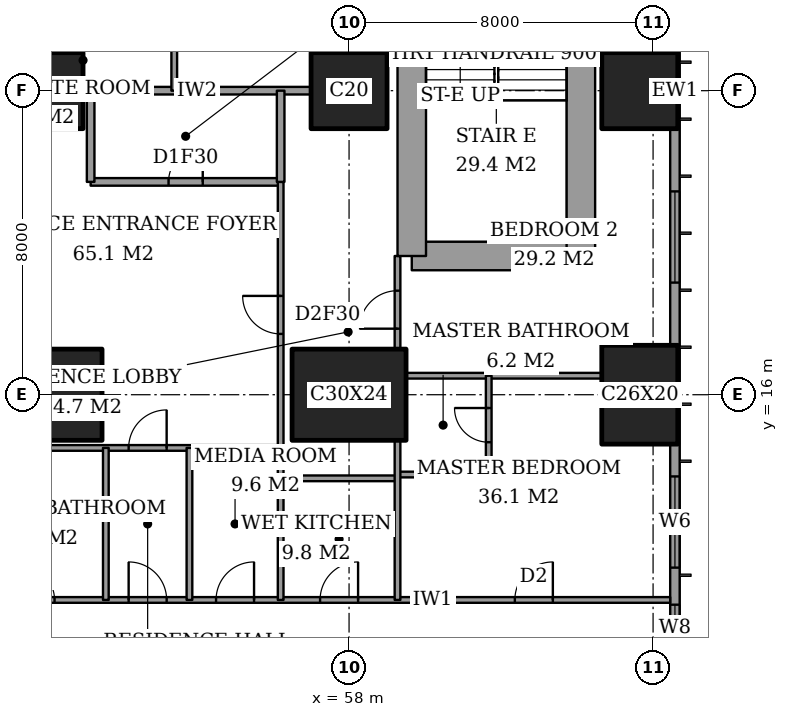
"""IFC4 building model, lengths in metres.
Left out: names, types, materials, properties, quantities, classifications, styles, units other than length and angle.
Written with IfcOpenShell. Run it as: python <this file> out.ifc"""

import sys

from ifc_helpers import new_model, si_unit, direction, frame, frame_2d, origin, origin_2d, place, context, subcontext, project, spatial, rectangle, extrude, element, fill, save


model = new_model("IFC4")
c1 = context("Model", 3, precision=1e-05, world=origin(), true_north=direction((0.0, 1.0)))
c2 = subcontext(c1, "Body", "Model", "MODEL_VIEW")
j1 = project(units=[si_unit("LENGTHUNIT", "METRE"), si_unit("PLANEANGLEUNIT", "RADIAN")], contexts=[c1])
p1 = place(None, origin())
s1 = spatial("IfcSite", under=j1, at=p1, CompositionType="ELEMENT")
p2 = place(p1, origin())
s2 = spatial("IfcBuilding", under=s1, at=p2, CompositionType="ELEMENT")
p3 = place(p2, frame((0.0, 0.0, 33.2)))
s3 = spatial("IfcBuildingStorey", under=s2, at=p3, CompositionType="ELEMENT", Elevation=33.2)
p4 = place(p3, frame((50.0, 16.0, 0.0), z_axis=(0.0, 0.0, 1.0), x_axis=(1.0, 0.0, 0.0)))
e1 = element("IfcColumn", 1, at=p4, inside=s3, PredefinedType="COLUMN", context=c2, shape_type="SweptSolid", body=[
    extrude(rectangle(XDim=3.0, YDim=2.4, at=origin_2d()), origin(), (0.0, 0.0, 1.0), 3.6),
])
p5 = place(p3, frame((50.0, 24.0, 0.0), z_axis=(0.0, 0.0, 1.0), x_axis=(1.0, 0.0, 0.0)))
e2 = element("IfcColumn", 2, at=p5, inside=s3, PredefinedType="COLUMN", context=c2, shape_type="SweptSolid", body=[
    extrude(rectangle(XDim=2.0, YDim=2.0, at=origin_2d()), origin(), (0.0, 0.0, 1.0), 3.6),
])
p6 = place(p3, frame((58.0, 16.0, 0.0), z_axis=(0.0, 0.0, 1.0), x_axis=(1.0, 0.0, 0.0)))
e3 = element("IfcColumn", 3, at=p6, inside=s3, PredefinedType="COLUMN", context=c2, shape_type="SweptSolid", body=[
    extrude(rectangle(XDim=3.0, YDim=2.4, at=origin_2d()), origin(), (0.0, 0.0, 1.0), 3.6),
])
p7 = place(p3, frame((58.0, 24.0, 0.0), z_axis=(0.0, 0.0, 1.0), x_axis=(1.0, 0.0, 0.0)))
e4 = element("IfcColumn", 4, at=p7, inside=s3, PredefinedType="COLUMN", context=c2, shape_type="SweptSolid", body=[
    extrude(rectangle(XDim=2.0, YDim=2.0, at=origin_2d()), origin(), (0.0, 0.0, 1.0), 3.6),
])
p8 = place(p3, frame((65.65, 16.0, 0.0), z_axis=(0.0, 0.0, 1.0), x_axis=(0.0, 1.0, 0.0)))
e5 = element("IfcColumn", 5, at=p8, inside=s3, PredefinedType="COLUMN", context=c2, shape_type="SweptSolid", body=[
    extrude(rectangle(XDim=2.6, YDim=2.0, at=origin_2d()), origin(), (0.0, 0.0, 1.0), 3.6),
])
p9 = place(p3, frame((65.65, 24.0, 0.0), z_axis=(0.0, 0.0, 1.0), x_axis=(1.0, 0.0, 0.0)))
e6 = element("IfcColumn", 6, at=p9, inside=s3, PredefinedType="COLUMN", context=c2, shape_type="SweptSolid", body=[
    extrude(rectangle(XDim=2.0, YDim=2.0, at=origin_2d()), origin(), (0.0, 0.0, 1.0), 3.6),
])
p10 = place(p3, frame((59.65, 19.65, 0.0), z_axis=(0.0, 0.0, 1.0), x_axis=(1.0, 0.0, 0.0)))
e7 = element("IfcWall", 7, at=p10, inside=s3, PredefinedType="SHEAR", context=c2, shape_type="SweptSolid", body=[
    extrude(rectangle(XDim=4.45, YDim=0.75, at=frame_2d((2.225, 0.0))), origin(), (0.0, 0.0, 1.0), 3.6),
])
p11 = place(p3, frame((64.1, 19.65, 0.0), z_axis=(0.0, 0.0, 1.0), x_axis=(0.0, 1.0, 0.0)))
e8 = element("IfcWall", 8, at=p11, inside=s3, PredefinedType="SHEAR", context=c2, shape_type="SweptSolid", body=[
    extrude(rectangle(XDim=8.7, YDim=0.75, at=frame_2d((4.35, 0.0))), origin(), (0.0, 0.0, 1.0), 3.6),
])
p12 = place(p3, frame((59.65, 28.35, 0.0), z_axis=(0.0, 0.0, 1.0), x_axis=(0.0, -1.0, 0.0)))
e9 = element("IfcWall", 9, at=p12, inside=s3, PredefinedType="SHEAR", context=c2, shape_type="SweptSolid", body=[
    extrude(rectangle(XDim=8.7, YDim=0.75, at=frame_2d((4.35, 0.0))), origin(), (0.0, 0.0, 1.0), 3.6),
])
p13 = place(p12, frame((0.975, 0.0, 0.0)))
e10 = element("IfcOpeningElement", 10, at=p13, cuts=e9, PredefinedType="OPENING", context=c2, shape_type="SweptSolid", body=[
    extrude(rectangle(XDim=1.0, YDim=2.1, at=frame_2d((0.5, 1.05))), frame((0.0, 0.385, 0.0), z_axis=(0.0, -1.0, 0.0), x_axis=(1.0, 0.0, 0.0)), (0.0, 0.0, 1.0), 0.77),
])
p14 = place(p3, frame((66.575, 3.175, 0.0), z_axis=(0.0, 0.0, 1.0), x_axis=(0.0, 1.0, 0.0)))
e11 = element("IfcWall", 11, at=p14, inside=s3, PredefinedType="SOLIDWALL", context=c2, shape_type="SweptSolid", body=[
    extrude(rectangle(XDim=41.65, YDim=0.25, at=frame_2d((20.825, 0.0))), origin(), (0.0, 0.0, 1.0), 3.6),
])
p15 = place(p14, frame((0.775, 0.0, 0.6)))
e12 = element("IfcOpeningElement", 12, at=p15, cuts=e11, PredefinedType="OPENING", context=c2, shape_type="SweptSolid", body=[
    extrude(rectangle(XDim=2.4, YDim=2.0, at=frame_2d((1.2, 1.0))), frame((0.0, 0.135, 0.0), z_axis=(0.0, -1.0, 0.0), x_axis=(1.0, 0.0, 0.0)), (0.0, 0.0, 1.0), 0.27),
])
p16 = place(p14, frame((6.1, 0.0, 0.6)))
e13 = element("IfcOpeningElement", 13, at=p16, cuts=e11, PredefinedType="OPENING", context=c2, shape_type="SweptSolid", body=[
    extrude(rectangle(XDim=1.2, YDim=2.0, at=frame_2d((0.6, 1.0))), frame((0.0, 0.135, 0.0), z_axis=(0.0, -1.0, 0.0), x_axis=(1.0, 0.0, 0.0)), (0.0, 0.0, 1.0), 0.27),
])
p17 = place(p14, frame((8.275, 0.0, 0.6)))
e14 = element("IfcOpeningElement", 14, at=p17, cuts=e11, PredefinedType="OPENING", context=c2, shape_type="SweptSolid", body=[
    extrude(rectangle(XDim=2.4, YDim=2.0, at=frame_2d((1.2, 1.0))), frame((0.0, 0.135, 0.0), z_axis=(0.0, -1.0, 0.0), x_axis=(1.0, 0.0, 0.0)), (0.0, 0.0, 1.0), 0.27),
])
p18 = place(p14, frame((15.775, 0.0, 0.6)))
e15 = element("IfcOpeningElement", 15, at=p18, cuts=e11, PredefinedType="OPENING", context=c2, shape_type="SweptSolid", body=[
    extrude(rectangle(XDim=2.4, YDim=2.0, at=frame_2d((1.2, 1.0))), frame((0.0, 0.135, 0.0), z_axis=(0.0, -1.0, 0.0), x_axis=(1.0, 0.0, 0.0)), (0.0, 0.0, 1.0), 0.27),
])
p19 = place(p14, frame((23.475, 0.0, 0.6)))
e16 = element("IfcOpeningElement", 16, at=p19, cuts=e11, PredefinedType="OPENING", context=c2, shape_type="SweptSolid", body=[
    extrude(rectangle(XDim=2.4, YDim=2.0, at=frame_2d((1.2, 1.0))), frame((0.0, 0.135, 0.0), z_axis=(0.0, -1.0, 0.0), x_axis=(1.0, 0.0, 0.0)), (0.0, 0.0, 1.0), 0.27),
])
p20 = place(p14, frame((30.975, 0.0, 0.6)))
e17 = element("IfcOpeningElement", 17, at=p20, cuts=e11, PredefinedType="OPENING", context=c2, shape_type="SweptSolid", body=[
    extrude(rectangle(XDim=2.4, YDim=2.0, at=frame_2d((1.2, 1.0))), frame((0.0, 0.135, 0.0), z_axis=(0.0, -1.0, 0.0), x_axis=(1.0, 0.0, 0.0)), (0.0, 0.0, 1.0), 0.27),
])
p21 = place(p14, frame((34.5, 0.0, 0.6)))
e18 = element("IfcOpeningElement", 18, at=p21, cuts=e11, PredefinedType="OPENING", context=c2, shape_type="SweptSolid", body=[
    extrude(rectangle(XDim=1.2, YDim=2.0, at=frame_2d((0.6, 1.0))), frame((0.0, 0.135, 0.0), z_axis=(0.0, -1.0, 0.0), x_axis=(1.0, 0.0, 0.0)), (0.0, 0.0, 1.0), 0.27),
])
p22 = place(p14, frame((38.475, 0.0, 0.6)))
e19 = element("IfcOpeningElement", 19, at=p22, cuts=e11, PredefinedType="OPENING", context=c2, shape_type="SweptSolid", body=[
    extrude(rectangle(XDim=2.4, YDim=2.0, at=frame_2d((1.2, 1.0))), frame((0.0, 0.135, 0.0), z_axis=(0.0, -1.0, 0.0), x_axis=(1.0, 0.0, 0.0)), (0.0, 0.0, 1.0), 0.27),
])
p23 = place(p3, frame((41.439, 10.6, 0.0), z_axis=(0.0, 0.0, 1.0), x_axis=(1.0, 0.0, 0.0)))
e20 = element("IfcWall", 20, at=p23, inside=s3, PredefinedType="PARTITIONING", context=c2, shape_type="SweptSolid", body=[
    extrude(rectangle(XDim=25.011, YDim=0.15, at=frame_2d((12.505, 0.0))), origin(), (0.0, 0.0, 1.0), 3.35),
])
p24 = place(p23, frame((10.761, 0.0, 0.0)))
e21 = element("IfcOpeningElement", 21, at=p24, cuts=e20, PredefinedType="OPENING", context=c2, shape_type="SweptSolid", body=[
    extrude(rectangle(XDim=1.0, YDim=2.1, at=frame_2d((0.5, 1.05))), frame((0.0, 0.085, 0.0), z_axis=(0.0, -1.0, 0.0), x_axis=(1.0, 0.0, 0.0)), (0.0, 0.0, 1.0), 0.17),
])
p25 = place(p23, frame((20.924, 0.0, 0.0)))
e22 = element("IfcOpeningElement", 22, at=p25, cuts=e20, PredefinedType="OPENING", context=c2, shape_type="SweptSolid", body=[
    extrude(rectangle(XDim=1.0, YDim=2.1, at=frame_2d((0.5, 1.05))), frame((0.0, 0.085, 0.0), z_axis=(0.0, -1.0, 0.0), x_axis=(1.0, 0.0, 0.0)), (0.0, 0.0, 1.0), 0.17),
])
p26 = place(p23, frame((15.799, 0.0, 0.0)))
e23 = element("IfcOpeningElement", 23, at=p26, cuts=e20, PredefinedType="OPENING", context=c2, shape_type="SweptSolid", body=[
    extrude(rectangle(XDim=1.0, YDim=2.1, at=frame_2d((0.5, 1.05))), frame((0.0, 0.085, 0.0), z_axis=(0.0, -1.0, 0.0), x_axis=(1.0, 0.0, 0.0)), (0.0, 0.0, 1.0), 0.17),
])
p27 = place(p23, frame((13.061, 0.0, 0.0)))
e24 = element("IfcOpeningElement", 24, at=p27, cuts=e20, PredefinedType="OPENING", context=c2, shape_type="SweptSolid", body=[
    extrude(rectangle(XDim=1.0, YDim=2.1, at=frame_2d((0.5, 1.05))), frame((0.0, 0.085, 0.0), z_axis=(0.0, -1.0, 0.0), x_axis=(1.0, 0.0, 0.0)), (0.0, 0.0, 1.0), 0.17),
])
p28 = place(p23, frame((7.911, 0.0, 0.0)))
e25 = element("IfcOpeningElement", 25, at=p28, cuts=e20, PredefinedType="OPENING", context=c2, shape_type="SweptSolid", body=[
    extrude(rectangle(XDim=0.9, YDim=2.1, at=frame_2d((0.45, 1.05))), frame((0.0, 0.085, 0.0), z_axis=(0.0, -1.0, 0.0), x_axis=(1.0, 0.0, 0.0)), (0.0, 0.0, 1.0), 0.17),
])
p29 = place(p23, frame((2.836, 0.0, 0.0)))
e26 = element("IfcOpeningElement", 26, at=p29, cuts=e20, PredefinedType="OPENING", context=c2, shape_type="SweptSolid", body=[
    extrude(rectangle(XDim=1.0, YDim=2.1, at=frame_2d((0.5, 1.05))), frame((0.0, 0.085, 0.0), z_axis=(0.0, -1.0, 0.0), x_axis=(1.0, 0.0, 0.0)), (0.0, 0.0, 1.0), 0.17),
])
p30 = place(p3, frame((56.2, 13.8, 0.0), z_axis=(0.0, 0.0, 1.0), x_axis=(1.0, 0.0, 0.0)))
e27 = element("IfcWall", 27, at=p30, inside=s3, PredefinedType="PARTITIONING", context=c2, shape_type="SweptSolid", body=[
    extrude(rectangle(XDim=3.075, YDim=0.15, at=frame_2d((1.538, 0.0))), origin(), (0.0, 0.0, 1.0), 3.35),
])
p31 = place(p3, frame((59.275, 13.9, 0.0), z_axis=(0.0, 0.0, 1.0), x_axis=(1.0, 0.0, 0.0)))
e28 = element("IfcWall", 28, at=p31, inside=s3, PredefinedType="PARTITIONING", context=c2, shape_type="SweptSolid", body=[
    extrude(rectangle(XDim=2.4, YDim=0.15, at=frame_2d((1.2, 0.0))), origin(), (0.0, 0.0, 1.0), 3.35),
])
p32 = place(p3, frame((48.0, 14.6, 0.0), z_axis=(0.0, 0.0, 1.0), x_axis=(1.0, 0.0, 0.0)))
e29 = element("IfcWall", 29, at=p32, inside=s3, PredefinedType="PARTITIONING", context=c2, shape_type="SweptSolid", body=[
    extrude(rectangle(XDim=8.2, YDim=0.15, at=frame_2d((4.1, 0.0))), origin(), (0.0, 0.0, 1.0), 3.35),
])
p33 = place(p32, frame((4.2, 0.0, 0.0)))
e30 = element("IfcOpeningElement", 30, at=p33, cuts=e29, PredefinedType="OPENING", context=c2, shape_type="SweptSolid", body=[
    extrude(rectangle(XDim=1.0, YDim=2.1, at=frame_2d((0.5, 1.05))), frame((0.0, 0.085, 0.0), z_axis=(0.0, -1.0, 0.0), x_axis=(1.0, 0.0, 0.0)), (0.0, 0.0, 1.0), 0.17),
])
p34 = place(p3, frame((59.5, 16.5, 0.0), z_axis=(0.0, 0.0, 1.0), x_axis=(1.0, 0.0, 0.0)))
e31 = element("IfcWall", 31, at=p34, inside=s3, PredefinedType="PARTITIONING", context=c2, shape_type="SweptSolid", body=[
    extrude(rectangle(XDim=5.15, YDim=0.15, at=frame_2d((2.575, 0.0))), origin(), (0.0, 0.0, 1.0), 3.35),
])
p35 = place(p3, frame((51.2, 21.6, 0.0), z_axis=(0.0, 0.0, 1.0), x_axis=(1.0, 0.0, 0.0)))
e32 = element("IfcWall", 32, at=p35, inside=s3, PredefinedType="PARTITIONING", context=c2, shape_type="SweptSolid", body=[
    extrude(rectangle(XDim=5.0, YDim=0.2, at=frame_2d((2.5, 0.0))), origin(), (0.0, 0.0, 1.0), 3.35),
])
p36 = place(p35, frame((2.05, 0.0, 0.0)))
e33 = element("IfcOpeningElement", 33, at=p36, cuts=e32, PredefinedType="OPENING", context=c2, shape_type="SweptSolid", body=[
    extrude(rectangle(XDim=0.9, YDim=2.1, at=frame_2d((0.45, 1.05))), frame((0.0, 0.11, 0.0), z_axis=(0.0, -1.0, 0.0), x_axis=(1.0, 0.0, 0.0)), (0.0, 0.0, 1.0), 0.22),
])
p37 = place(p3, frame((51.0, 24.0, 0.0), z_axis=(0.0, 0.0, 1.0), x_axis=(1.0, 0.0, 0.0)))
e34 = element("IfcWall", 34, at=p37, inside=s3, PredefinedType="PARTITIONING", context=c2, shape_type="SweptSolid", body=[
    extrude(rectangle(XDim=6.0, YDim=0.2, at=frame_2d((3.0, 0.0))), origin(), (0.0, 0.0, 1.0), 3.35),
])
p38 = place(p3, frame((51.2, 21.6, 0.0), z_axis=(0.0, 0.0, 1.0), x_axis=(0.0, 1.0, 0.0)))
e35 = element("IfcWall", 35, at=p38, inside=s3, PredefinedType="PARTITIONING", context=c2, shape_type="SweptSolid", body=[
    extrude(rectangle(XDim=2.4, YDim=0.2, at=frame_2d((1.2, 0.0))), origin(), (0.0, 0.0, 1.0), 3.35),
])
p39 = place(p3, frame((51.6, 10.6, 0.0), z_axis=(0.0, 0.0, 1.0), x_axis=(0.0, 1.0, 0.0)))
e36 = element("IfcWall", 36, at=p39, inside=s3, PredefinedType="PARTITIONING", context=c2, shape_type="SweptSolid", body=[
    extrude(rectangle(XDim=4.0, YDim=0.15, at=frame_2d((2.0, 0.0))), origin(), (0.0, 0.0, 1.0), 3.35),
])
p40 = place(p3, frame((53.4, 24.0, 0.0), z_axis=(0.0, 0.0, 1.0), x_axis=(0.0, 1.0, 0.0)))
e37 = element("IfcWall", 37, at=p40, inside=s3, PredefinedType="PARTITIONING", context=c2, shape_type="SweptSolid", body=[
    extrude(rectangle(XDim=1.6, YDim=0.15, at=frame_2d((0.8, 0.0))), origin(), (0.0, 0.0, 1.0), 3.35),
])
p41 = place(p3, frame((53.8, 10.6, 0.0), z_axis=(0.0, 0.0, 1.0), x_axis=(0.0, 1.0, 0.0)))
e38 = element("IfcWall", 38, at=p41, inside=s3, PredefinedType="PARTITIONING", context=c2, shape_type="SweptSolid", body=[
    extrude(rectangle(XDim=4.0, YDim=0.15, at=frame_2d((2.0, 0.0))), origin(), (0.0, 0.0, 1.0), 3.35),
])
p42 = place(p3, frame((56.2, 21.6, 0.0), z_axis=(0.0, 0.0, 1.0), x_axis=(0.0, 1.0, 0.0)))
e39 = element("IfcWall", 39, at=p42, inside=s3, PredefinedType="PARTITIONING", context=c2, shape_type="SweptSolid", body=[
    extrude(rectangle(XDim=2.4, YDim=0.2, at=frame_2d((1.2, 0.0))), origin(), (0.0, 0.0, 1.0), 3.35),
])
p43 = place(p3, frame((56.2, 10.6, 0.0), z_axis=(0.0, 0.0, 1.0), x_axis=(0.0, 1.0, 0.0)))
e40 = element("IfcWall", 40, at=p43, inside=s3, PredefinedType="PARTITIONING", context=c2, shape_type="SweptSolid", body=[
    extrude(rectangle(XDim=11.0, YDim=0.15, at=frame_2d((5.5, 0.0))), origin(), (0.0, 0.0, 1.0), 3.35),
])
p44 = place(p43, frame((7.0, 0.0, 0.0)))
e41 = element("IfcOpeningElement", 41, at=p44, cuts=e40, PredefinedType="OPENING", context=c2, shape_type="SweptSolid", body=[
    extrude(rectangle(XDim=1.0, YDim=2.1, at=frame_2d((0.5, 1.05))), frame((0.0, 0.085, 0.0), z_axis=(0.0, -1.0, 0.0), x_axis=(1.0, 0.0, 0.0)), (0.0, 0.0, 1.0), 0.17),
])
p45 = place(p3, frame((59.275, 10.6, 0.0), z_axis=(0.0, 0.0, 1.0), x_axis=(0.0, 1.0, 0.0)))
e42 = element("IfcWall", 42, at=p45, inside=s3, PredefinedType="PARTITIONING", context=c2, shape_type="SweptSolid", body=[
    extrude(rectangle(XDim=4.2, YDim=0.15, at=frame_2d((2.1, 0.0))), origin(), (0.0, 0.0, 1.0), 3.35),
])
p46 = place(p3, frame((59.275, 17.2, 0.0), z_axis=(0.0, 0.0, 1.0), x_axis=(0.0, 1.0, 0.0)))
e43 = element("IfcWall", 43, at=p46, inside=s3, PredefinedType="PARTITIONING", context=c2, shape_type="SweptSolid", body=[
    extrude(rectangle(XDim=2.45, YDim=0.15, at=frame_2d((1.225, 0.0))), origin(), (0.0, 0.0, 1.0), 3.35),
])
p47 = place(p46, frame((0.538, 0.0, 0.0)))
e44 = element("IfcOpeningElement", 44, at=p47, cuts=e43, PredefinedType="OPENING", context=c2, shape_type="SweptSolid", body=[
    extrude(rectangle(XDim=1.0, YDim=2.1, at=frame_2d((0.5, 1.05))), frame((0.0, 0.085, 0.0), z_axis=(0.0, -1.0, 0.0), x_axis=(1.0, 0.0, 0.0)), (0.0, 0.0, 1.0), 0.17),
])
p48 = place(p3, frame((61.675, 13.9, 0.0), z_axis=(0.0, 0.0, 1.0), x_axis=(0.0, 1.0, 0.0)))
e45 = element("IfcWall", 45, at=p48, inside=s3, PredefinedType="PARTITIONING", context=c2, shape_type="SweptSolid", body=[
    extrude(rectangle(XDim=2.6, YDim=0.15, at=frame_2d((1.3, 0.0))), origin(), (0.0, 0.0, 1.0), 3.35),
])
p49 = place(p48, frame((0.85, 0.0, 0.0)))
e46 = element("IfcOpeningElement", 46, at=p49, cuts=e45, PredefinedType="OPENING", context=c2, shape_type="SweptSolid", body=[
    extrude(rectangle(XDim=0.9, YDim=2.1, at=frame_2d((0.45, 1.05))), frame((0.0, 0.085, 0.0), z_axis=(0.0, -1.0, 0.0), x_axis=(1.0, 0.0, 0.0)), (0.0, 0.0, 1.0), 0.17),
])
p50 = place(p16, origin())
e47 = element("IfcWindow", 47, at=p50, inside=s3, PartitioningType="SINGLE_PANEL", PredefinedType="WINDOW", context=c2, shape_type="SweptSolid", body=[
    extrude(rectangle(XDim=1.2, YDim=2.0, at=frame_2d((0.6, 1.0))), frame((0.0, 0.03, 0.0), z_axis=(0.0, -1.0, 0.0), x_axis=(1.0, 0.0, 0.0)), (0.0, 0.0, 1.0), 0.06),
])
fill(e13, e47)
p51 = place(p17, origin())
e48 = element("IfcWindow", 48, at=p51, inside=s3, PartitioningType="SINGLE_PANEL", PredefinedType="WINDOW", context=c2, shape_type="SweptSolid", body=[
    extrude(rectangle(XDim=2.4, YDim=2.0, at=frame_2d((1.2, 1.0))), frame((0.0, 0.03, 0.0), z_axis=(0.0, -1.0, 0.0), x_axis=(1.0, 0.0, 0.0)), (0.0, 0.0, 1.0), 0.06),
])
fill(e14, e48)
p52 = place(p18, origin())
e49 = element("IfcWindow", 49, at=p52, inside=s3, PartitioningType="SINGLE_PANEL", PredefinedType="WINDOW", context=c2, shape_type="SweptSolid", body=[
    extrude(rectangle(XDim=2.4, YDim=2.0, at=frame_2d((1.2, 1.0))), frame((0.0, 0.03, 0.0), z_axis=(0.0, -1.0, 0.0), x_axis=(1.0, 0.0, 0.0)), (0.0, 0.0, 1.0), 0.06),
])
fill(e15, e49)
p53 = place(p24, origin())
e50 = element("IfcDoor", 50, at=p53, inside=s3, OperationType="SINGLE_SWING_RIGHT", PredefinedType="DOOR", context=c2, shape_type="SweptSolid", body=[
    extrude(rectangle(XDim=1.0, YDim=2.1, at=frame_2d((0.5, 1.05))), frame((0.0, 0.025, 0.0), z_axis=(0.0, -1.0, 0.0), x_axis=(1.0, 0.0, 0.0)), (0.0, 0.0, 1.0), 0.05),
])
fill(e21, e50)
p54 = place(p49, origin())
e51 = element("IfcDoor", 51, at=p54, inside=s3, OperationType="SINGLE_SWING_LEFT", PredefinedType="DOOR", context=c2, shape_type="SweptSolid", body=[
    extrude(rectangle(XDim=0.9, YDim=2.1, at=frame_2d((0.45, 1.05))), frame((0.0, 0.025, 0.0), z_axis=(0.0, -1.0, 0.0), x_axis=(1.0, 0.0, 0.0)), (0.0, 0.0, 1.0), 0.05),
])
fill(e46, e51)
p55 = place(p25, origin())
e52 = element("IfcDoor", 52, at=p55, inside=s3, OperationType="SINGLE_SWING_LEFT", PredefinedType="DOOR", context=c2, shape_type="SweptSolid", body=[
    extrude(rectangle(XDim=1.0, YDim=2.1, at=frame_2d((0.5, 1.05))), frame((0.0, 0.025, 0.0), z_axis=(0.0, -1.0, 0.0), x_axis=(1.0, 0.0, 0.0)), (0.0, 0.0, 1.0), 0.05),
])
fill(e22, e52)
p56 = place(p47, origin())
e53 = element("IfcDoor", 53, at=p56, inside=s3, OperationType="SINGLE_SWING_RIGHT", PredefinedType="DOOR", context=c2, shape_type="SweptSolid", body=[
    extrude(rectangle(XDim=1.0, YDim=2.1, at=frame_2d((0.5, 1.05))), frame((0.0, 0.025, 0.0), z_axis=(0.0, -1.0, 0.0), x_axis=(1.0, 0.0, 0.0)), (0.0, 0.0, 1.0), 0.05),
])
fill(e44, e53)
p57 = place(p26, origin())
e54 = element("IfcDoor", 54, at=p57, inside=s3, OperationType="SINGLE_SWING_LEFT", PredefinedType="DOOR", context=c2, shape_type="SweptSolid", body=[
    extrude(rectangle(XDim=1.0, YDim=2.1, at=frame_2d((0.5, 1.05))), frame((0.0, 0.025, 0.0), z_axis=(0.0, -1.0, 0.0), x_axis=(1.0, 0.0, 0.0)), (0.0, 0.0, 1.0), 0.05),
])
fill(e23, e54)
p58 = place(p44, origin())
e55 = element("IfcDoor", 55, at=p58, inside=s3, OperationType="SINGLE_SWING_LEFT", PredefinedType="DOOR", context=c2, shape_type="SweptSolid", body=[
    extrude(rectangle(XDim=1.0, YDim=2.1, at=frame_2d((0.5, 1.05))), frame((0.0, 0.025, 0.0), z_axis=(0.0, -1.0, 0.0), x_axis=(1.0, 0.0, 0.0)), (0.0, 0.0, 1.0), 0.05),
])
fill(e41, e55)
p59 = place(p36, origin())
e56 = element("IfcDoor", 56, at=p59, inside=s3, OperationType="SINGLE_SWING_LEFT", PredefinedType="DOOR", context=c2, shape_type="SweptSolid", body=[
    extrude(rectangle(XDim=0.9, YDim=2.1, at=frame_2d((0.45, 1.05))), frame((0.0, 0.025, 0.0), z_axis=(0.0, -1.0, 0.0), x_axis=(1.0, 0.0, 0.0)), (0.0, 0.0, 1.0), 0.05),
])
fill(e33, e56)
p60 = place(p27, origin())
e57 = element("IfcDoor", 57, at=p60, inside=s3, OperationType="SINGLE_SWING_LEFT", PredefinedType="DOOR", context=c2, shape_type="SweptSolid", body=[
    extrude(rectangle(XDim=1.0, YDim=2.1, at=frame_2d((0.5, 1.05))), frame((0.0, 0.025, 0.0), z_axis=(0.0, -1.0, 0.0), x_axis=(1.0, 0.0, 0.0)), (0.0, 0.0, 1.0), 0.05),
])
fill(e24, e57)
p61 = place(p33, origin())
e58 = element("IfcDoor", 58, at=p61, inside=s3, OperationType="SINGLE_SWING_LEFT", PredefinedType="DOOR", context=c2, shape_type="SweptSolid", body=[
    extrude(rectangle(XDim=1.0, YDim=2.1, at=frame_2d((0.5, 1.05))), frame((0.0, 0.025, 0.0), z_axis=(0.0, -1.0, 0.0), x_axis=(1.0, 0.0, 0.0)), (0.0, 0.0, 1.0), 0.05),
])
fill(e30, e58)
p62 = place(p28, origin())
e59 = element("IfcDoor", 59, at=p62, inside=s3, OperationType="SINGLE_SWING_RIGHT", PredefinedType="DOOR", context=c2, shape_type="SweptSolid", body=[
    extrude(rectangle(XDim=0.9, YDim=2.1, at=frame_2d((0.45, 1.05))), frame((0.0, 0.025, 0.0), z_axis=(0.0, -1.0, 0.0), x_axis=(1.0, 0.0, 0.0)), (0.0, 0.0, 1.0), 0.05),
])
fill(e25, e59)
save(model, sys.argv[1])
